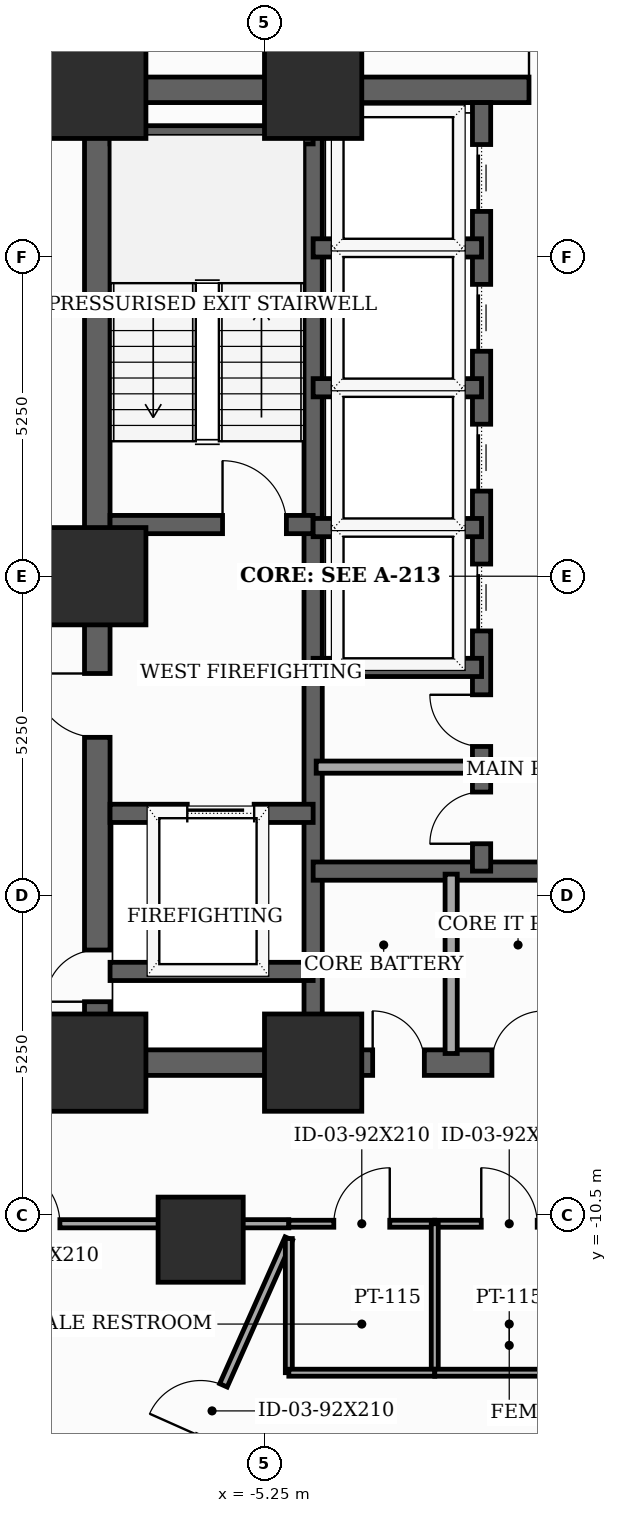
"""IFC4 building model, lengths in metres.
Left out: names, types, materials, properties, quantities, classifications, styles, units other than length and angle.
Written with IfcOpenShell. Run it as: python <this file> out.ifc"""

import sys

from ifc_helpers import new_model, si_unit, direction, frame, frame_2d, origin, origin_2d, place, context, subcontext, project, spatial, rectangle, extrude, element, fill, save


model = new_model("IFC4")
c1 = context("Model", 3, precision=1e-05, world=origin(), true_north=direction((0.0, 1.0)))
c2 = subcontext(c1, "Body", "Model", "MODEL_VIEW")
j1 = project(units=[si_unit("LENGTHUNIT", "METRE"), si_unit("PLANEANGLEUNIT", "RADIAN")], contexts=[c1])
p1 = place(None, origin())
s1 = spatial("IfcSite", under=j1, at=p1, CompositionType="ELEMENT")
p2 = place(p1, origin())
s2 = spatial("IfcBuilding", under=s1, at=p2, CompositionType="ELEMENT")
p3 = place(p2, frame((0.0, 0.0, 48.2)))
s3 = spatial("IfcBuildingStorey", under=s2, at=p3, CompositionType="ELEMENT", Elevation=48.2)
for number, where, z_axis, x_axis in (
    (1, (-8.0, -8.0, 0.0), (0.0, 0.0, 1.0), (1.0, 0.0, 0.0)),
    (2, (-4.45, -8.0, 0.0), (0.0, 0.0, 1.0), (1.0, 0.0, 0.0)),
    (3, (-4.45, 8.0, 0.0), (0.0, 0.0, 1.0), (1.0, 0.0, 0.0)),
    (4, (-8.0, 8.0, 0.0), (0.0, 0.0, 1.0), (1.0, 0.0, 0.0)),
    (5, (-8.0, 0.0, 0.0), (0.0, 0.0, 1.0), (1.0, 0.0, 0.0)),
):
    element("IfcColumn", number, at=place(p3, frame(where, z_axis=z_axis, x_axis=x_axis)), inside=s3, PredefinedType="COLUMN", context=c2, shape_type="SweptSolid", body=[
        extrude(rectangle(XDim=1.6, YDim=1.6, at=origin_2d()), origin(), (0.0, 0.0, 1.0), 3.7),
    ])
p4 = place(p3, frame((-6.3, -10.912, 0.0), z_axis=(0.0, 0.0, 1.0), x_axis=(1.0, 0.0, 0.0)))
e6 = element("IfcColumn", 6, at=p4, inside=s3, PredefinedType="COLUMN", context=c2, shape_type="SweptSolid", body=[
    extrude(rectangle(XDim=1.4, YDim=1.4, at=origin_2d()), origin(), (0.0, 0.0, 1.0), 3.7),
])
p5 = place(p3, frame((-8.0, -8.0, 0.0), z_axis=(0.0, 0.0, 1.0), x_axis=(0.0, 1.0, 0.0)))
e7 = element("IfcWall", 7, at=p5, inside=s3, PredefinedType="SHEAR", context=c2, shape_type="SweptSolid", body=[
    extrude(rectangle(XDim=16.0, YDim=0.42, at=frame_2d((8.0, 0.0))), origin(), (0.0, 0.0, 1.0), 3.5),
])
p6 = place(p5, frame((1.002, 0.0, 0.0)))
e8 = element("IfcOpeningElement", 8, at=p6, cuts=e7, PredefinedType="OPENING", context=c2, shape_type="SweptSolid", body=[
    extrude(rectangle(XDim=0.85, YDim=2.02, at=frame_2d((0.425, 1.01))), frame((0.0, 0.22, 0.0), z_axis=(0.0, -1.0, 0.0), x_axis=(1.0, 0.0, 0.0)), (0.0, 0.0, 1.0), 0.44),
])
p7 = place(p5, frame((5.35, 0.0, 0.0)))
e9 = element("IfcOpeningElement", 9, at=p7, cuts=e7, PredefinedType="OPENING", context=c2, shape_type="SweptSolid", body=[
    extrude(rectangle(XDim=1.05, YDim=2.15, at=frame_2d((0.525, 1.075))), frame((0.0, 0.22, 0.0), z_axis=(0.0, -1.0, 0.0), x_axis=(1.0, 0.0, 0.0)), (0.0, 0.0, 1.0), 0.44),
])
p8 = place(p3, frame((-8.0, -8.0, 0.0), z_axis=(0.0, 0.0, 1.0), x_axis=(1.0, 0.0, 0.0)))
e10 = element("IfcWall", 10, at=p8, inside=s3, PredefinedType="SHEAR", context=c2, shape_type="SweptSolid", body=[
    extrude(rectangle(XDim=16.0, YDim=0.42, at=frame_2d((8.0, 0.0))), origin(), (0.0, 0.0, 1.0), 3.5),
])
p9 = place(p8, frame((4.529, 0.0, 0.0)))
e11 = element("IfcOpeningElement", 11, at=p9, cuts=e10, PredefinedType="OPENING", context=c2, shape_type="SweptSolid", body=[
    extrude(rectangle(XDim=0.85, YDim=2.02, at=frame_2d((0.425, 1.01))), frame((0.0, 0.22, 0.0), z_axis=(0.0, -1.0, 0.0), x_axis=(1.0, 0.0, 0.0)), (0.0, 0.0, 1.0), 0.44),
])
p10 = place(p8, frame((6.49, 0.0, 0.0)))
e12 = element("IfcOpeningElement", 12, at=p10, cuts=e10, PredefinedType="OPENING", context=c2, shape_type="SweptSolid", body=[
    extrude(rectangle(XDim=0.85, YDim=2.02, at=frame_2d((0.425, 1.01))), frame((0.0, 0.22, 0.0), z_axis=(0.0, -1.0, 0.0), x_axis=(1.0, 0.0, 0.0)), (0.0, 0.0, 1.0), 0.44),
])
p11 = place(p8, frame((8.69, 0.0, 0.0)))
e13 = element("IfcOpeningElement", 13, at=p11, cuts=e10, PredefinedType="OPENING", context=c2, shape_type="SweptSolid", body=[
    extrude(rectangle(XDim=0.85, YDim=2.02, at=frame_2d((0.425, 1.01))), frame((0.0, 0.22, 0.0), z_axis=(0.0, -1.0, 0.0), x_axis=(1.0, 0.0, 0.0)), (0.0, 0.0, 1.0), 0.44),
])
p12 = place(p8, frame((10.621, 0.0, 0.0)))
e14 = element("IfcOpeningElement", 14, at=p12, cuts=e10, PredefinedType="OPENING", context=c2, shape_type="SweptSolid", body=[
    extrude(rectangle(XDim=0.85, YDim=2.02, at=frame_2d((0.425, 1.01))), frame((0.0, 0.22, 0.0), z_axis=(0.0, -1.0, 0.0), x_axis=(1.0, 0.0, 0.0)), (0.0, 0.0, 1.0), 0.44),
])
p13 = place(p3, frame((-8.0, 8.0, 0.0), z_axis=(0.0, 0.0, 1.0), x_axis=(1.0, 0.0, 0.0)))
e15 = element("IfcWall", 15, at=p13, inside=s3, PredefinedType="SHEAR", context=c2, shape_type="SweptSolid", body=[
    extrude(rectangle(XDim=16.0, YDim=0.42, at=frame_2d((8.0, 0.0))), origin(), (0.0, 0.0, 1.0), 3.5),
])
p14 = place(p13, frame((7.1, 0.0, 0.0)))
e16 = element("IfcOpeningElement", 16, at=p14, cuts=e15, PredefinedType="OPENING", context=c2, shape_type="SweptSolid", body=[
    extrude(rectangle(XDim=1.8, YDim=2.15, at=frame_2d((0.9, 1.075))), frame((0.0, 0.22, 0.0), z_axis=(0.0, -1.0, 0.0), x_axis=(1.0, 0.0, 0.0)), (0.0, 0.0, 1.0), 0.44),
])
p15 = place(p3, frame((-4.45, -7.79, 0.0), z_axis=(0.0, 0.0, 1.0), x_axis=(0.0, 1.0, 0.0)))
e17 = element("IfcWall", 17, at=p15, inside=s3, PredefinedType="SHEAR", context=c2, shape_type="SweptSolid", body=[
    extrude(rectangle(XDim=15.58, YDim=0.3, at=frame_2d((7.79, 0.0))), origin(), (0.0, 0.0, 1.0), 3.5),
])
p16 = place(p3, frame((-7.79, 0.85, 0.0), z_axis=(0.0, 0.0, 1.0), x_axis=(1.0, 0.0, 0.0)))
e18 = element("IfcWall", 18, at=p16, inside=s3, PredefinedType="SHEAR", context=c2, shape_type="SweptSolid", body=[
    extrude(rectangle(XDim=3.34, YDim=0.3, at=frame_2d((1.67, 0.0))), origin(), (0.0, 0.0, 1.0), 3.5),
])
p17 = place(p16, frame((1.85, 0.0, 0.0)))
e19 = element("IfcOpeningElement", 19, at=p17, cuts=e18, PredefinedType="OPENING", context=c2, shape_type="SweptSolid", body=[
    extrude(rectangle(XDim=1.05, YDim=2.15, at=frame_2d((0.525, 1.075))), frame((0.0, 0.16, 0.0), z_axis=(0.0, -1.0, 0.0), x_axis=(1.0, 0.0, 0.0)), (0.0, 0.0, 1.0), 0.32),
])
p18 = place(p3, frame((-7.79, 7.26, 0.0), z_axis=(0.0, 0.0, 1.0), x_axis=(1.0, 0.0, 0.0)))
e20 = element("IfcWall", 20, at=p18, inside=s3, PredefinedType="SHEAR", context=c2, shape_type="SweptSolid", body=[
    extrude(rectangle(XDim=3.34, YDim=0.3, at=frame_2d((1.67, 0.0))), origin(), (0.0, 0.0, 1.0), 3.5),
])
p19 = place(p3, frame((-7.79, -3.9, 0.0), z_axis=(0.0, 0.0, 1.0), x_axis=(1.0, 0.0, 0.0)))
e21 = element("IfcWall", 21, at=p19, inside=s3, PredefinedType="SHEAR", context=c2, shape_type="SweptSolid", body=[
    extrude(rectangle(XDim=3.34, YDim=0.3, at=frame_2d((1.67, 0.0))), origin(), (0.0, 0.0, 1.0), 3.5),
])
p20 = place(p19, frame((1.27, 0.0, 0.0)))
e22 = element("IfcOpeningElement", 22, at=p20, cuts=e21, PredefinedType="OPENING", context=c2, shape_type="SweptSolid", body=[
    extrude(rectangle(XDim=1.1, YDim=2.1, at=frame_2d((0.55, 1.05))), frame((0.0, 0.16, 0.0), z_axis=(0.0, -1.0, 0.0), x_axis=(1.0, 0.0, 0.0)), (0.0, 0.0, 1.0), 0.32),
])
p21 = place(p3, frame((-7.79, -6.5, 0.0), z_axis=(0.0, 0.0, 1.0), x_axis=(1.0, 0.0, 0.0)))
e23 = element("IfcWall", 23, at=p21, inside=s3, PredefinedType="SHEAR", context=c2, shape_type="SweptSolid", body=[
    extrude(rectangle(XDim=3.34, YDim=0.3, at=frame_2d((1.67, 0.0))), origin(), (0.0, 0.0, 1.0), 3.5),
])
p22 = place(p3, frame((-4.45, -4.85, 0.0), z_axis=(0.0, 0.0, 1.0), x_axis=(1.0, 0.0, 0.0)))
e24 = element("IfcWall", 24, at=p22, inside=s3, PredefinedType="SHEAR", context=c2, shape_type="SweptSolid", body=[
    extrude(rectangle(XDim=8.9, YDim=0.3, at=frame_2d((4.45, 0.0))), origin(), (0.0, 0.0, 1.0), 3.5),
])
p23 = place(p3, frame((-1.68, -4.85, 0.0), z_axis=(0.0, 0.0, 1.0), x_axis=(0.0, 1.0, 0.0)))
e25 = element("IfcWall", 25, at=p23, inside=s3, PredefinedType="SHEAR", context=c2, shape_type="SweptSolid", body=[
    extrude(rectangle(XDim=12.64, YDim=0.3, at=frame_2d((6.32, 0.0))), origin(), (0.0, 0.0, 1.0), 3.5),
])
p24 = place(p23, frame((3.95, 0.0, 0.0)))
e26 = element("IfcOpeningElement", 26, at=p24, cuts=e25, PredefinedType="OPENING", context=c2, shape_type="SweptSolid", body=[
    extrude(rectangle(XDim=1.1, YDim=2.1, at=frame_2d((0.55, 1.05))), frame((0.0, 0.16, 0.0), z_axis=(0.0, -1.0, 0.0), x_axis=(1.0, 0.0, 0.0)), (0.0, 0.0, 1.0), 0.32),
])
p25 = place(p23, frame((6.25, 0.0, 0.0)))
e27 = element("IfcOpeningElement", 27, at=p25, cuts=e25, PredefinedType="OPENING", context=c2, shape_type="SweptSolid", body=[
    extrude(rectangle(XDim=1.1, YDim=2.1, at=frame_2d((0.55, 1.05))), frame((0.0, 0.16, 0.0), z_axis=(0.0, -1.0, 0.0), x_axis=(1.0, 0.0, 0.0)), (0.0, 0.0, 1.0), 0.32),
])
p26 = place(p23, frame((8.55, 0.0, 0.0)))
e28 = element("IfcOpeningElement", 28, at=p26, cuts=e25, PredefinedType="OPENING", context=c2, shape_type="SweptSolid", body=[
    extrude(rectangle(XDim=1.1, YDim=2.1, at=frame_2d((0.55, 1.05))), frame((0.0, 0.16, 0.0), z_axis=(0.0, -1.0, 0.0), x_axis=(1.0, 0.0, 0.0)), (0.0, 0.0, 1.0), 0.32),
])
p27 = place(p23, frame((10.85, 0.0, 0.0)))
e29 = element("IfcOpeningElement", 29, at=p27, cuts=e25, PredefinedType="OPENING", context=c2, shape_type="SweptSolid", body=[
    extrude(rectangle(XDim=1.1, YDim=2.1, at=frame_2d((0.55, 1.05))), frame((0.0, 0.16, 0.0), z_axis=(0.0, -1.0, 0.0), x_axis=(1.0, 0.0, 0.0)), (0.0, 0.0, 1.0), 0.32),
])
p28 = place(p23, frame((0.45, 0.0, 0.0)))
e30 = element("IfcOpeningElement", 30, at=p28, cuts=e25, PredefinedType="OPENING", context=c2, shape_type="SweptSolid", body=[
    extrude(rectangle(XDim=0.85, YDim=2.02, at=frame_2d((0.425, 1.01))), frame((0.0, 0.16, 0.0), z_axis=(0.0, -1.0, 0.0), x_axis=(1.0, 0.0, 0.0)), (0.0, 0.0, 1.0), 0.32),
])
p29 = place(p23, frame((2.05, 0.0, 0.0)))
e31 = element("IfcOpeningElement", 31, at=p29, cuts=e25, PredefinedType="OPENING", context=c2, shape_type="SweptSolid", body=[
    extrude(rectangle(XDim=0.85, YDim=2.02, at=frame_2d((0.425, 1.01))), frame((0.0, 0.16, 0.0), z_axis=(0.0, -1.0, 0.0), x_axis=(1.0, 0.0, 0.0)), (0.0, 0.0, 1.0), 0.32),
])
for number, where, z_axis, x_axis in (
    (32, (-4.45, -1.5, 0.0), (0.0, 0.0, 1.0), (1.0, 0.0, 0.0)),
    (33, (-4.45, 0.8, 0.0), (0.0, 0.0, 1.0), (1.0, 0.0, 0.0)),
    (34, (-4.45, 3.1, 0.0), (0.0, 0.0, 1.0), (1.0, 0.0, 0.0)),
    (35, (-4.45, 5.4, 0.0), (0.0, 0.0, 1.0), (1.0, 0.0, 0.0)),
):
    element("IfcWall", number, at=place(p3, frame(where, z_axis=z_axis, x_axis=x_axis)), inside=s3, PredefinedType="SHEAR", context=c2, shape_type="SweptSolid", body=[
        extrude(rectangle(XDim=2.77, YDim=0.3, at=frame_2d((1.385, 0.0))), origin(), (0.0, 0.0, 1.0), 3.5),
    ])
p30 = place(p3, frame((-2.18, -7.85, 0.0), z_axis=(0.0, 0.0, 1.0), x_axis=(0.0, 1.0, 0.0)))
e36 = element("IfcWall", 36, at=p30, inside=s3, PredefinedType="SOLIDWALL", context=c2, shape_type="SweptSolid", body=[
    extrude(rectangle(XDim=2.95, YDim=0.2, at=frame_2d((1.475, 0.0))), origin(), (0.0, 0.0, 1.0), 2.885),
])
p31 = place(p3, frame((-4.4, -3.14, 0.0), z_axis=(0.0, 0.0, 1.0), x_axis=(1.0, 0.0, 0.0)))
e37 = element("IfcWall", 37, at=p31, inside=s3, PredefinedType="SOLIDWALL", context=c2, shape_type="SweptSolid", body=[
    extrude(rectangle(XDim=2.68, YDim=0.2, at=frame_2d((1.34, 0.0))), origin(), (0.0, 0.0, 1.0), 3.5),
])
p32 = place(p3, frame((-10.15, -10.65, 0.0), z_axis=(0.0, 0.0, 1.0), x_axis=(1.0, 0.0, 0.0)))
e38 = element("IfcWall", 38, at=p32, inside=s3, PredefinedType="PARTITIONING", context=c2, shape_type="SweptSolid", body=[
    extrude(rectangle(XDim=5.3, YDim=0.135, at=frame_2d((2.65, 0.0))), origin(), (0.0, 0.0, 1.0), 2.785),
])
p33 = place(p32, frame((0.585, 0.0, 0.0)))
e39 = element("IfcOpeningElement", 39, at=p33, cuts=e38, PredefinedType="OPENING", context=c2, shape_type="SweptSolid", body=[
    extrude(rectangle(XDim=0.95, YDim=2.1, at=frame_2d((0.475, 1.05))), frame((0.0, 0.077, 0.0), z_axis=(0.0, -1.0, 0.0), x_axis=(1.0, 0.0, 0.0)), (0.0, 0.0, 1.0), 0.155),
])
p34 = place(p3, frame((-4.85, -10.65, 0.0), z_axis=(0.0, 0.0, 1.0), x_axis=(1.0, 0.0, 0.0)))
e40 = element("IfcWall", 40, at=p34, inside=s3, PredefinedType="PARTITIONING", context=c2, shape_type="SweptSolid", body=[
    extrude(rectangle(XDim=2.4, YDim=0.115, at=frame_2d((1.2, 0.0))), origin(), (0.0, 0.0, 1.0), 3.5),
])
p35 = place(p34, frame((0.74, 0.0, 0.0)))
e41 = element("IfcOpeningElement", 41, at=p35, cuts=e40, PredefinedType="OPENING", context=c2, shape_type="SweptSolid", body=[
    extrude(rectangle(XDim=0.92, YDim=2.1, at=frame_2d((0.46, 1.05))), frame((0.0, 0.067, 0.0), z_axis=(0.0, -1.0, 0.0), x_axis=(1.0, 0.0, 0.0)), (0.0, 0.0, 1.0), 0.135),
])
p36 = place(p3, frame((-2.45, -10.65, 0.0), z_axis=(0.0, 0.0, 1.0), x_axis=(1.0, 0.0, 0.0)))
e42 = element("IfcWall", 42, at=p36, inside=s3, PredefinedType="PARTITIONING", context=c2, shape_type="SweptSolid", body=[
    extrude(rectangle(XDim=2.45, YDim=0.115, at=frame_2d((1.225, 0.0))), origin(), (0.0, 0.0, 1.0), 2.785),
])
p37 = place(p36, frame((0.765, 0.0, 0.0)))
e43 = element("IfcOpeningElement", 43, at=p37, cuts=e42, PredefinedType="OPENING", context=c2, shape_type="SweptSolid", body=[
    extrude(rectangle(XDim=0.92, YDim=2.1, at=frame_2d((0.46, 1.05))), frame((0.0, 0.067, 0.0), z_axis=(0.0, -1.0, 0.0), x_axis=(1.0, 0.0, 0.0)), (0.0, 0.0, 1.0), 0.135),
])
p38 = place(p3, frame((-6.886, -15.466, 0.0), z_axis=(0.0, 0.0, 1.0), x_axis=(0.406713095633, 0.913555941276, 0.0)))
e44 = element("IfcWall", 44, at=p38, inside=s3, PredefinedType="PARTITIONING", context=c2, shape_type="SweptSolid", body=[
    extrude(rectangle(XDim=5.006, YDim=0.135, at=frame_2d((2.503, 0.0))), origin(), (0.0, 0.0, 1.0), 2.685),
])
p39 = place(p38, frame((1.442, 0.0, 0.0)))
e45 = element("IfcOpeningElement", 45, at=p39, cuts=e44, PredefinedType="OPENING", context=c2, shape_type="SweptSolid", body=[
    extrude(rectangle(XDim=0.92, YDim=2.1, at=frame_2d((0.46, 1.05))), frame((0.0, 0.077, 0.0), z_axis=(0.0, -1.0, 0.0), x_axis=(1.0, 0.0, 0.0)), (0.0, 0.0, 1.0), 0.155),
])
p40 = place(p3, frame((-2.45, -13.1, 0.0), z_axis=(0.0, 0.0, 1.0), x_axis=(0.0, 1.0, 0.0)))
e46 = element("IfcWall", 46, at=p40, inside=s3, PredefinedType="PARTITIONING", context=c2, shape_type="SweptSolid", body=[
    extrude(rectangle(XDim=2.45, YDim=0.115, at=frame_2d((1.225, 0.0))), origin(), (0.0, 0.0, 1.0), 2.785),
])
p41 = place(p3, frame((-4.85, -10.893, 0.0), z_axis=(0.0, 0.0, 1.0), x_axis=(0.0, -1.0, 0.0)))
e47 = element("IfcWall", 47, at=p41, inside=s3, PredefinedType="PARTITIONING", context=c2, shape_type="SweptSolid", body=[
    extrude(rectangle(XDim=2.207, YDim=0.115, at=frame_2d((1.104, 0.0))), origin(), (0.0, 0.0, 1.0), 2.785),
])
p42 = place(p3, frame((-4.85, -13.1, 0.0), z_axis=(0.0, 0.0, 1.0), x_axis=(1.0, 0.0, 0.0)))
e48 = element("IfcWall", 48, at=p42, inside=s3, PredefinedType="PARTITIONING", context=c2, shape_type="SweptSolid", body=[
    extrude(rectangle(XDim=2.4, YDim=0.115, at=frame_2d((1.2, 0.0))), origin(), (0.0, 0.0, 1.0), 3.5),
])
p43 = place(p3, frame((-2.45, -13.1, 0.0), z_axis=(0.0, 0.0, 1.0), x_axis=(1.0, 0.0, 0.0)))
e49 = element("IfcWall", 49, at=p43, inside=s3, PredefinedType="PARTITIONING", context=c2, shape_type="SweptSolid", body=[
    extrude(rectangle(XDim=2.45, YDim=0.115, at=frame_2d((1.225, 0.0))), origin(), (0.0, 0.0, 1.0), 3.5),
])
p44 = place(p6, origin())
e50 = element("IfcDoor", 50, at=p44, inside=s3, OperationType="SINGLE_SWING_LEFT", PredefinedType="TRAPDOOR", context=c2, shape_type="SweptSolid", body=[
    extrude(rectangle(XDim=0.85, YDim=2.02, at=frame_2d((0.425, 1.01))), frame((0.0, 0.025, 0.0), z_axis=(0.0, -1.0, 0.0), x_axis=(1.0, 0.0, 0.0)), (0.0, 0.0, 1.0), 0.05),
])
fill(e8, e50)
p45 = place(p7, origin())
e51 = element("IfcDoor", 51, at=p45, inside=s3, OperationType="SINGLE_SWING_RIGHT", PredefinedType="DOOR", context=c2, shape_type="SweptSolid", body=[
    extrude(rectangle(XDim=1.05, YDim=2.15, at=frame_2d((0.525, 1.075))), frame((0.0, 0.025, 0.0), z_axis=(0.0, -1.0, 0.0), x_axis=(1.0, 0.0, 0.0)), (0.0, 0.0, 1.0), 0.05),
])
fill(e9, e51)
p46 = place(p9, origin())
e52 = element("IfcDoor", 52, at=p46, inside=s3, OperationType="SINGLE_SWING_LEFT", PredefinedType="TRAPDOOR", context=c2, shape_type="SweptSolid", body=[
    extrude(rectangle(XDim=0.85, YDim=2.02, at=frame_2d((0.425, 1.01))), frame((0.0, 0.025, 0.0), z_axis=(0.0, -1.0, 0.0), x_axis=(1.0, 0.0, 0.0)), (0.0, 0.0, 1.0), 0.05),
])
fill(e11, e52)
p47 = place(p10, origin())
e53 = element("IfcDoor", 53, at=p47, inside=s3, OperationType="SINGLE_SWING_RIGHT", PredefinedType="TRAPDOOR", context=c2, shape_type="SweptSolid", body=[
    extrude(rectangle(XDim=0.85, YDim=2.02, at=frame_2d((0.425, 1.01))), frame((0.0, 0.025, 0.0), z_axis=(0.0, -1.0, 0.0), x_axis=(1.0, 0.0, 0.0)), (0.0, 0.0, 1.0), 0.05),
])
fill(e12, e53)
p48 = place(p14, origin())
e54 = element("IfcDoor", 54, at=p48, inside=s3, OperationType="DOUBLE_DOOR_SINGLE_SWING", PredefinedType="DOOR", context=c2, shape_type="SweptSolid", body=[
    extrude(rectangle(XDim=1.8, YDim=2.15, at=frame_2d((0.9, 1.075))), frame((0.0, 0.025, 0.0), z_axis=(0.0, -1.0, 0.0), x_axis=(1.0, 0.0, 0.0)), (0.0, 0.0, 1.0), 0.05),
])
fill(e16, e54)
p49 = place(p17, origin())
e55 = element("IfcDoor", 55, at=p49, inside=s3, OperationType="SINGLE_SWING_LEFT", PredefinedType="DOOR", context=c2, shape_type="SweptSolid", body=[
    extrude(rectangle(XDim=1.05, YDim=2.15, at=frame_2d((0.525, 1.075))), frame((0.0, 0.025, 0.0), z_axis=(0.0, -1.0, 0.0), x_axis=(1.0, 0.0, 0.0)), (0.0, 0.0, 1.0), 0.05),
])
fill(e19, e55)
p50 = place(p20, origin())
e56 = element("IfcDoor", 56, at=p50, inside=s3, OperationType="SLIDING_TO_LEFT", PredefinedType="DOOR", context=c2, shape_type="SweptSolid", body=[
    extrude(rectangle(XDim=1.1, YDim=2.1, at=frame_2d((0.55, 1.05))), frame((0.0, 0.025, 0.0), z_axis=(0.0, -1.0, 0.0), x_axis=(1.0, 0.0, 0.0)), (0.0, 0.0, 1.0), 0.05),
])
fill(e22, e56)
p51 = place(p24, origin())
e57 = element("IfcDoor", 57, at=p51, inside=s3, OperationType="SLIDING_TO_LEFT", PredefinedType="DOOR", context=c2, shape_type="SweptSolid", body=[
    extrude(rectangle(XDim=1.1, YDim=2.1, at=frame_2d((0.55, 1.05))), frame((0.0, 0.025, 0.0), z_axis=(0.0, -1.0, 0.0), x_axis=(1.0, 0.0, 0.0)), (0.0, 0.0, 1.0), 0.05),
])
fill(e26, e57)
p52 = place(p25, origin())
e58 = element("IfcDoor", 58, at=p52, inside=s3, OperationType="SLIDING_TO_LEFT", PredefinedType="DOOR", context=c2, shape_type="SweptSolid", body=[
    extrude(rectangle(XDim=1.1, YDim=2.1, at=frame_2d((0.55, 1.05))), frame((0.0, 0.025, 0.0), z_axis=(0.0, -1.0, 0.0), x_axis=(1.0, 0.0, 0.0)), (0.0, 0.0, 1.0), 0.05),
])
fill(e27, e58)
p53 = place(p26, origin())
e59 = element("IfcDoor", 59, at=p53, inside=s3, OperationType="SLIDING_TO_LEFT", PredefinedType="DOOR", context=c2, shape_type="SweptSolid", body=[
    extrude(rectangle(XDim=1.1, YDim=2.1, at=frame_2d((0.55, 1.05))), frame((0.0, 0.025, 0.0), z_axis=(0.0, -1.0, 0.0), x_axis=(1.0, 0.0, 0.0)), (0.0, 0.0, 1.0), 0.05),
])
fill(e28, e59)
p54 = place(p27, origin())
e60 = element("IfcDoor", 60, at=p54, inside=s3, OperationType="SLIDING_TO_LEFT", PredefinedType="DOOR", context=c2, shape_type="SweptSolid", body=[
    extrude(rectangle(XDim=1.1, YDim=2.1, at=frame_2d((0.55, 1.05))), frame((0.0, 0.025, 0.0), z_axis=(0.0, -1.0, 0.0), x_axis=(1.0, 0.0, 0.0)), (0.0, 0.0, 1.0), 0.05),
])
fill(e29, e60)
p55 = place(p28, origin())
e61 = element("IfcDoor", 61, at=p55, inside=s3, OperationType="SINGLE_SWING_LEFT", PredefinedType="TRAPDOOR", context=c2, shape_type="SweptSolid", body=[
    extrude(rectangle(XDim=0.85, YDim=2.02, at=frame_2d((0.425, 1.01))), frame((0.0, 0.025, 0.0), z_axis=(0.0, -1.0, 0.0), x_axis=(1.0, 0.0, 0.0)), (0.0, 0.0, 1.0), 0.05),
])
fill(e30, e61)
p56 = place(p29, origin())
e62 = element("IfcDoor", 62, at=p56, inside=s3, OperationType="SINGLE_SWING_RIGHT", PredefinedType="TRAPDOOR", context=c2, shape_type="SweptSolid", body=[
    extrude(rectangle(XDim=0.85, YDim=2.02, at=frame_2d((0.425, 1.01))), frame((0.0, 0.025, 0.0), z_axis=(0.0, -1.0, 0.0), x_axis=(1.0, 0.0, 0.0)), (0.0, 0.0, 1.0), 0.05),
])
fill(e31, e62)
p57 = place(p33, origin())
e63 = element("IfcDoor", 63, at=p57, inside=s3, OperationType="SINGLE_SWING_LEFT", PredefinedType="DOOR", context=c2, shape_type="SweptSolid", body=[
    extrude(rectangle(XDim=0.95, YDim=2.1, at=frame_2d((0.475, 1.05))), frame((0.0, 0.025, 0.0), z_axis=(0.0, -1.0, 0.0), x_axis=(1.0, 0.0, 0.0)), (0.0, 0.0, 1.0), 0.05),
])
fill(e39, e63)
p58 = place(p35, origin())
e64 = element("IfcDoor", 64, at=p58, inside=s3, OperationType="SINGLE_SWING_RIGHT", PredefinedType="DOOR", context=c2, shape_type="SweptSolid", body=[
    extrude(rectangle(XDim=0.92, YDim=2.1, at=frame_2d((0.46, 1.05))), frame((0.0, 0.025, 0.0), z_axis=(0.0, -1.0, 0.0), x_axis=(1.0, 0.0, 0.0)), (0.0, 0.0, 1.0), 0.05),
])
fill(e41, e64)
p59 = place(p37, origin())
e65 = element("IfcDoor", 65, at=p59, inside=s3, OperationType="SINGLE_SWING_LEFT", PredefinedType="DOOR", context=c2, shape_type="SweptSolid", body=[
    extrude(rectangle(XDim=0.92, YDim=2.1, at=frame_2d((0.46, 1.05))), frame((0.0, 0.025, 0.0), z_axis=(0.0, -1.0, 0.0), x_axis=(1.0, 0.0, 0.0)), (0.0, 0.0, 1.0), 0.05),
])
fill(e43, e65)
p60 = place(p39, origin())
e66 = element("IfcDoor", 66, at=p60, inside=s3, OperationType="SINGLE_SWING_LEFT", PredefinedType="DOOR", context=c2, shape_type="SweptSolid", body=[
    extrude(rectangle(XDim=0.92, YDim=2.1, at=frame_2d((0.46, 1.05))), frame((0.0, 0.025, 0.0), z_axis=(0.0, -1.0, 0.0), x_axis=(1.0, 0.0, 0.0)), (0.0, 0.0, 1.0), 0.05),
])
fill(e45, e66)
save(model, sys.argv[1])
